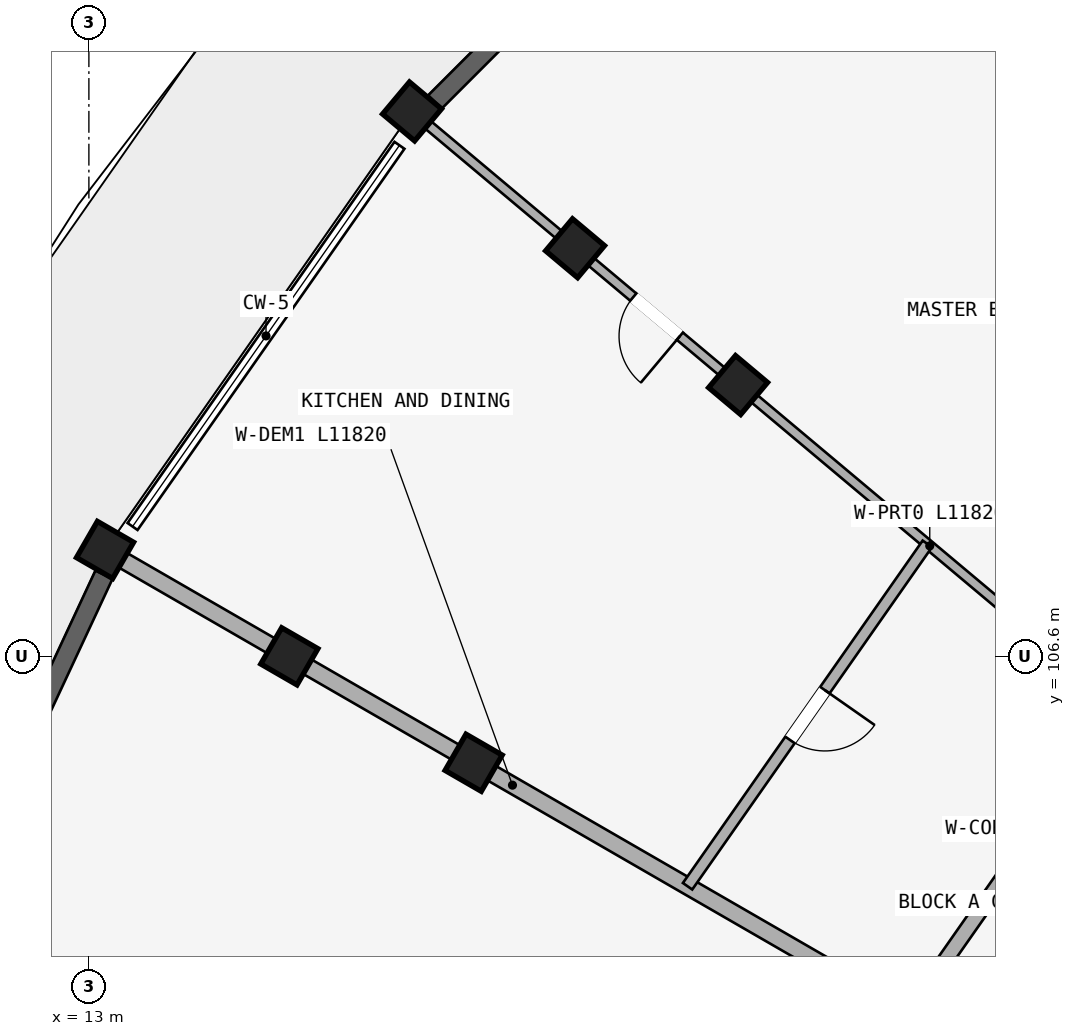
"""IFC4 building model, lengths in metres.
Left out: names, types, materials, properties, quantities, classifications, styles, units other than length and angle.
Written with IfcOpenShell. Run it as: python <this file> out.ifc"""

import sys

from ifc_helpers import new_model, si_unit, direction, frame, frame_2d, origin, origin_2d, place, context, subcontext, project, spatial, rectangle, extrude, element, fill, save


model = new_model("IFC4")
c1 = context("Model", 3, precision=1e-05, world=origin(), true_north=direction((0.0, 1.0)))
c2 = subcontext(c1, "Body", "Model", "MODEL_VIEW")
j1 = project(units=[si_unit("LENGTHUNIT", "METRE"), si_unit("PLANEANGLEUNIT", "RADIAN")], contexts=[c1])
p1 = place(None, origin())
s1 = spatial("IfcSite", under=j1, at=p1, CompositionType="ELEMENT")
p2 = place(p1, origin())
s2 = spatial("IfcBuilding", under=s1, at=p2, CompositionType="ELEMENT")
p3 = place(p2, frame((0.0, 0.0, 43.35)))
s3 = spatial("IfcBuildingStorey", under=s2, at=p3, CompositionType="ELEMENT", Elevation=43.35)
for number, where, z_axis, x_axis in (
    (1, (21.542, 110.169, 0.0), (0.0, 0.0, 1.0), (0.643, 0.766, 0.0)),
    (2, (19.397, 111.969, 0.0), (0.0, 0.0, 1.0), (0.643, 0.766, 0.0)),
):
    element("IfcColumn", number, at=place(p3, frame(where, z_axis=z_axis, x_axis=x_axis)), inside=s3, PredefinedType="COLUMN", context=c2, shape_type="SweptSolid", body=[
        extrude(rectangle(XDim=0.55, YDim=0.55, at=origin_2d()), origin(), (0.0, 0.0, 1.0), 2.93),
    ])
p4 = place(p3, frame((17.252, 113.769, 0.0), z_axis=(0.0, 0.0, 1.0), x_axis=(0.642787609687, 0.766044443119, 0.0)))
e3 = element("IfcColumn", 3, at=p4, inside=s3, PredefinedType="COLUMN", context=c2, shape_type="SweptSolid", body=[
    extrude(rectangle(XDim=0.55, YDim=0.55, at=origin_2d()), origin(), (0.0, 0.0, 1.0), 2.97),
])
for number, where, z_axis, x_axis in (
    (4, (18.062, 105.2, 0.0), (0.0, 0.0, 1.0), (0.5, 0.866, 0.0)),
    (5, (15.637, 106.6, 0.0), (0.0, 0.0, 1.0), (0.5, 0.866, 0.0)),
):
    element("IfcColumn", number, at=place(p3, frame(where, z_axis=z_axis, x_axis=x_axis)), inside=s3, PredefinedType="COLUMN", context=c2, shape_type="SweptSolid", body=[
        extrude(rectangle(XDim=0.55, YDim=0.55, at=origin_2d()), origin(), (0.0, 0.0, 1.0), 2.93),
    ])
p5 = place(p3, frame((13.213, 108.0, 0.0), z_axis=(0.0, 0.0, 1.0), x_axis=(0.5, 0.866025403784, 0.0)))
e6 = element("IfcColumn", 6, at=p5, inside=s3, PredefinedType="COLUMN", context=c2, shape_type="SweptSolid", body=[
    extrude(rectangle(XDim=0.55, YDim=0.55, at=origin_2d()), origin(), (0.0, 0.0, 1.0), 2.97),
])
p6 = place(p3, frame((26.598, 105.927, 0.0), z_axis=(0.0, 0.0, 1.0), x_axis=(-0.573592335331, -0.819140911474, 0.0)))
e7 = element("IfcWall", 7, at=p6, inside=s3, PredefinedType="STANDARD", context=c2, shape_type="SweptSolid", body=[
    extrude(rectangle(XDim=4.916, YDim=0.2, at=frame_2d((2.458, 0.0))), origin(), (0.0, 0.0, 1.0), 2.372),
])
p7 = place(p3, frame((30.009, 109.479, 0.0), z_axis=(0.0, 0.0, 1.0), x_axis=(-0.642781220531, 0.766049804211, 0.0)))
e8 = element("IfcWall", 8, at=p7, inside=s3, PredefinedType="PARTITIONING", context=c2, shape_type="SweptSolid", body=[
    extrude(rectangle(XDim=11.82, YDim=0.125, at=frame_2d((5.91, 0.0))), origin(), (0.0, 0.0, 1.0), 2.372),
])
p8 = place(p7, frame((7.5, 0.0, 0.0)))
e9 = element("IfcOpeningElement", 9, at=p8, cuts=e8, PredefinedType="OPENING", context=c2, shape_type="SweptSolid", body=[
    extrude(rectangle(XDim=0.8, YDim=2.1, at=frame_2d((0.4, 1.05))), frame((0.0, 0.073, 0.0), z_axis=(0.0, -1.0, 0.0), x_axis=(1.0, 0.0, 0.0)), (0.0, 0.0, 1.0), 0.145),
])
p9 = place(p3, frame((26.521, 105.991, 0.0), z_axis=(0.0, 0.0, 1.0), x_axis=(-0.766049804211, 0.642781220531, 0.0)))
e10 = element("IfcWall", 10, at=p9, inside=s3, PredefinedType="PARTITIONING", context=c2, shape_type="SweptSolid", body=[
    extrude(rectangle(XDim=11.82, YDim=0.125, at=frame_2d((5.91, 0.0))), origin(), (0.0, 0.0, 1.0), 2.372),
])
p10 = place(p9, frame((7.5, 0.0, 0.0)))
e11 = element("IfcOpeningElement", 11, at=p10, cuts=e10, PredefinedType="OPENING", context=c2, shape_type="SweptSolid", body=[
    extrude(rectangle(XDim=0.8, YDim=2.1, at=frame_2d((0.4, 1.05))), frame((0.0, 0.073, 0.0), z_axis=(0.0, -1.0, 0.0), x_axis=(1.0, 0.0, 0.0)), (0.0, 0.0, 1.0), 0.145),
])
p11 = place(p3, frame((23.691, 101.95, 0.0), z_axis=(0.0, 0.0, 1.0), x_axis=(-0.866017730655, 0.500013290014, 0.0)))
e12 = element("IfcWall", 12, at=p11, inside=s3, PredefinedType="STANDARD", context=c2, shape_type="SweptSolid", body=[
    extrude(rectangle(XDim=11.82, YDim=0.22, at=frame_2d((5.91, 0.0))), origin(), (0.0, 0.0, 1.0), 2.372),
])
p12 = place(p3, frame((24.031, 108.08, 0.0), z_axis=(0.0, 0.0, 1.0), x_axis=(-0.573569599955, -0.819156831143, 0.0)))
e13 = element("IfcWall", 13, at=p12, inside=s3, PredefinedType="PLUMBINGWALL", context=c2, shape_type="SweptSolid", body=[
    extrude(rectangle(XDim=5.5, YDim=0.15, at=frame_2d((2.75, 0.0))), origin(), (0.0, 0.0, 1.0), 2.372),
])
p13 = place(p12, frame((2.35, 0.0, 0.0)))
e14 = element("IfcOpeningElement", 14, at=p13, cuts=e13, PredefinedType="OPENING", context=c2, shape_type="SweptSolid", body=[
    extrude(rectangle(XDim=0.8, YDim=2.1, at=frame_2d((0.4, 1.05))), frame((0.0, 0.085, 0.0), z_axis=(0.0, -1.0, 0.0), x_axis=(1.0, 0.0, 0.0)), (0.0, 0.0, 1.0), 0.17),
])
p14 = place(p3, frame((22.107, 118.447, 0.0), z_axis=(0.0, 0.0, 1.0), x_axis=(-0.707106781187, -0.707106781187, 0.0)))
e15 = element("IfcWall", 15, at=p14, inside=s3, PredefinedType="STANDARD", context=c2, shape_type="SweptSolid", body=[
    extrude(rectangle(XDim=6.441, YDim=0.25, at=frame_2d((3.22, 0.0))), origin(), (0.0, 0.0, 1.0), 2.412),
])
p15 = place(p14, frame((4.155, 0.0, 0.562)))
e16 = element("IfcOpeningElement", 16, at=p15, cuts=e15, PredefinedType="OPENING", context=c2, shape_type="SweptSolid", body=[
    extrude(rectangle(XDim=1.2, YDim=1.5, at=frame_2d((0.6, 0.75))), frame((0.0, 0.135, 0.0), z_axis=(0.0, -1.0, 0.0), x_axis=(1.0, 0.0, 0.0)), (0.0, 0.0, 1.0), 0.27),
])
p16 = place(p14, frame((1.594, 0.0, 0.0)))
e17 = element("IfcOpeningElement", 17, at=p16, cuts=e15, PredefinedType="OPENING", context=c2, shape_type="SweptSolid", body=[
    extrude(rectangle(XDim=1.32, YDim=2.15, at=frame_2d((0.66, 1.075))), frame((0.0, 0.135, 0.0), z_axis=(0.0, -1.0, 0.0), x_axis=(1.0, 0.0, 0.0)), (0.0, 0.0, 1.0), 0.27),
])
p17 = place(p3, frame((13.199, 107.675, 0.0), z_axis=(0.0, 0.0, 1.0), x_axis=(-0.422590788426, -0.906320597547, 0.0)))
e18 = element("IfcWall", 18, at=p17, inside=s3, PredefinedType="STANDARD", context=c2, shape_type="SweptSolid", body=[
    extrude(rectangle(XDim=6.441, YDim=0.25, at=frame_2d((3.22, 0.0))), origin(), (0.0, 0.0, 1.0), 2.412),
])
p18 = place(p17, frame((2.271, 0.0, 0.462)))
e19 = element("IfcOpeningElement", 19, at=p18, cuts=e18, PredefinedType="OPENING", context=c2, shape_type="SweptSolid", body=[
    extrude(rectangle(XDim=1.9, YDim=1.75, at=frame_2d((0.95, 0.875))), frame((0.0, 0.135, 0.0), z_axis=(0.0, -1.0, 0.0), x_axis=(1.0, 0.0, 0.0)), (0.0, 0.0, 1.0), 0.27),
])
p19 = place(p10, frame((0.8, 0.0, 0.0), z_axis=(0.0, 0.0, 1.0), x_axis=(-1.0, 0.0, 0.0)))
e20 = element("IfcDoor", 20, at=p19, inside=s3, OperationType="SINGLE_SWING_RIGHT", PredefinedType="DOOR", context=c2, shape_type="SweptSolid", body=[
    extrude(rectangle(XDim=0.8, YDim=2.1, at=frame_2d((0.4, 1.05))), frame((0.0, 0.025, 0.0), z_axis=(0.0, -1.0, 0.0), x_axis=(1.0, 0.0, 0.0)), (0.0, 0.0, 1.0), 0.05),
])
fill(e11, e20)
p20 = place(p13, frame((0.8, 0.0, 0.0), z_axis=(0.0, 0.0, 1.0), x_axis=(-1.0, 0.0, 0.0)))
e21 = element("IfcDoor", 21, at=p20, inside=s3, OperationType="SINGLE_SWING_RIGHT", PredefinedType="DOOR", context=c2, shape_type="SweptSolid", body=[
    extrude(rectangle(XDim=0.8, YDim=2.1, at=frame_2d((0.4, 1.05))), frame((0.0, 0.025, 0.0), z_axis=(0.0, -1.0, 0.0), x_axis=(1.0, 0.0, 0.0)), (0.0, 0.0, 1.0), 0.05),
])
fill(e14, e21)
save(model, sys.argv[1])
